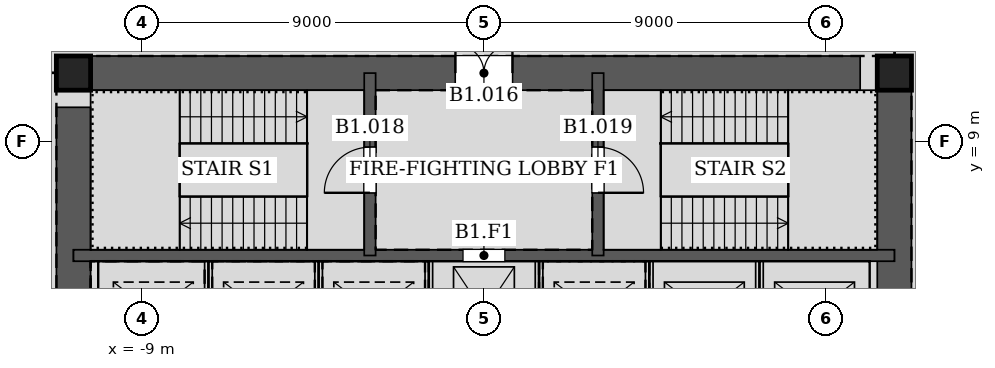
"""IFC4 building model, lengths in metres.
Left out: names, types, materials, properties, quantities, classifications, styles, units other than length and angle.
Written with IfcOpenShell. Run it as: python <this file> out.ifc"""

import sys

from ifc_helpers import new_model, si_unit, direction, frame, frame_2d, origin, origin_2d, place, context, subcontext, project, spatial, rectangle, hollow_rectangle, extrude, element, fill, save


model = new_model("IFC4")
c1 = context("Model", 3, precision=1e-05, world=origin(), true_north=direction((0.0, 1.0)))
c2 = subcontext(c1, "Body", "Model", "MODEL_VIEW")
j1 = project(units=[si_unit("LENGTHUNIT", "METRE"), si_unit("PLANEANGLEUNIT", "RADIAN")], contexts=[c1])
p1 = place(None, origin())
s1 = spatial("IfcSite", under=j1, at=p1, CompositionType="ELEMENT")
p2 = place(p1, origin())
s2 = spatial("IfcBuilding", under=s1, at=p2, CompositionType="ELEMENT")
p3 = place(p2, frame((0.0, 0.0, -4.5)))
s3 = spatial("IfcBuildingStorey", under=s2, at=p3, CompositionType="ELEMENT", Elevation=-4.5)
for number, where, z_axis, x_axis in (
    (1, (10.8, 10.8, 0.0), (0.0, 0.0, 1.0), (1.0, 0.0, 0.0)),
    (2, (-10.8, 10.8, 0.0), (0.0, 0.0, 1.0), (1.0, 0.0, 0.0)),
):
    element("IfcColumn", number, at=place(p3, frame(where, z_axis=z_axis, x_axis=x_axis)), inside=s3, PredefinedType="COLUMN", context=c2, shape_type="SweptSolid", body=[
        extrude(hollow_rectangle(XDim=0.9, YDim=0.9, WallThickness=0.06, at=origin_2d()), origin(), (0.0, 0.0, 1.0), 4.5),
    ])
p4 = place(p3, frame((10.8, -10.8, 0.0), z_axis=(0.0, 0.0, 1.0), x_axis=(0.0, 1.0, 0.0)))
e3 = element("IfcWall", 3, at=p4, inside=s3, PredefinedType="SOLIDWALL", context=c2, shape_type="SweptSolid", body=[
    extrude(rectangle(XDim=21.6, YDim=0.9, at=frame_2d((10.8, 0.0))), origin(), (0.0, 0.0, 1.0), 4.5),
])
p5 = place(p4, frame((11.7, 0.0, 0.0)))
e4 = element("IfcOpeningElement", 4, at=p5, cuts=e3, PredefinedType="OPENING", context=c2, shape_type="SweptSolid", body=[
    extrude(rectangle(XDim=1.2, YDim=2.1, at=frame_2d((0.6, 1.05))), frame((0.0, 0.46, 0.0), z_axis=(0.0, -1.0, 0.0), x_axis=(1.0, 0.0, 0.0)), (0.0, 0.0, 1.0), 0.92),
])
p6 = place(p4, frame((8.7, 0.0, 0.0)))
e5 = element("IfcOpeningElement", 5, at=p6, cuts=e3, PredefinedType="OPENING", context=c2, shape_type="SweptSolid", body=[
    extrude(rectangle(XDim=1.2, YDim=2.1, at=frame_2d((0.6, 1.05))), frame((0.0, 0.46, 0.0), z_axis=(0.0, -1.0, 0.0), x_axis=(1.0, 0.0, 0.0)), (0.0, 0.0, 1.0), 0.92),
])
p7 = place(p3, frame((10.8, 10.8, 0.0), z_axis=(0.0, 0.0, 1.0), x_axis=(-1.0, 0.0, 0.0)))
e6 = element("IfcWall", 6, at=p7, inside=s3, PredefinedType="SOLIDWALL", context=c2, shape_type="SweptSolid", body=[
    extrude(rectangle(XDim=21.6, YDim=0.9, at=frame_2d((10.8, 0.0))), origin(), (0.0, 0.0, 1.0), 4.5),
])
p8 = place(p7, frame((10.05, 0.0, 0.0)))
e7 = element("IfcOpeningElement", 7, at=p8, cuts=e6, PredefinedType="OPENING", context=c2, shape_type="SweptSolid", body=[
    extrude(rectangle(XDim=1.5, YDim=2.1, at=frame_2d((0.75, 1.05))), frame((0.0, 0.46, 0.0), z_axis=(0.0, -1.0, 0.0), x_axis=(1.0, 0.0, 0.0)), (0.0, 0.0, 1.0), 0.92),
])
p9 = place(p3, frame((-10.8, 10.8, 0.0), z_axis=(0.0, 0.0, 1.0), x_axis=(0.0, -1.0, 0.0)))
e8 = element("IfcWall", 8, at=p9, inside=s3, PredefinedType="SOLIDWALL", context=c2, shape_type="SweptSolid", body=[
    extrude(rectangle(XDim=21.6, YDim=0.9, at=frame_2d((10.8, 0.0))), origin(), (0.0, 0.0, 1.0), 4.5),
])
p10 = place(p9, frame((8.7, 0.0, 0.0)))
e9 = element("IfcOpeningElement", 9, at=p10, cuts=e8, PredefinedType="OPENING", context=c2, shape_type="SweptSolid", body=[
    extrude(rectangle(XDim=1.2, YDim=2.1, at=frame_2d((0.6, 1.05))), frame((0.0, 0.46, 0.0), z_axis=(0.0, -1.0, 0.0), x_axis=(1.0, 0.0, 0.0)), (0.0, 0.0, 1.0), 0.92),
])
p11 = place(p9, frame((11.7, 0.0, 0.0)))
e10 = element("IfcOpeningElement", 10, at=p11, cuts=e8, PredefinedType="OPENING", context=c2, shape_type="SweptSolid", body=[
    extrude(rectangle(XDim=1.2, YDim=2.1, at=frame_2d((0.6, 1.05))), frame((0.0, 0.46, 0.0), z_axis=(0.0, -1.0, 0.0), x_axis=(1.0, 0.0, 0.0)), (0.0, 0.0, 1.0), 0.92),
])
p12 = place(p3, frame((-10.8, 6.0, 0.0), z_axis=(0.0, 0.0, 1.0), x_axis=(1.0, 0.0, 0.0)))
e11 = element("IfcWall", 11, at=p12, inside=s3, PredefinedType="SOLIDWALL", context=c2, shape_type="SweptSolid", body=[
    extrude(rectangle(XDim=21.6, YDim=0.3, at=frame_2d((10.8, 0.0))), origin(), (0.0, 0.0, 1.0), 2.7),
])
p13 = place(p12, frame((10.25, 0.0, 0.0)))
e12 = element("IfcOpeningElement", 12, at=p13, cuts=e11, PredefinedType="OPENING", context=c2, shape_type="SweptSolid", body=[
    extrude(rectangle(XDim=1.1, YDim=2.1, at=frame_2d((0.55, 1.05))), frame((0.0, 0.16, 0.0), z_axis=(0.0, -1.0, 0.0), x_axis=(1.0, 0.0, 0.0)), (0.0, 0.0, 1.0), 0.32),
])
p14 = place(p3, frame((-10.8, 6.0, 2.7), z_axis=(0.0, 0.0, 1.0), x_axis=(1.0, 0.0, 0.0)))
e13 = element("IfcWall", 13, at=p14, inside=s3, PredefinedType="SOLIDWALL", context=c2, shape_type="SweptSolid", body=[
    extrude(rectangle(XDim=21.6, YDim=0.3, at=frame_2d((10.8, 0.0))), origin(), (0.0, 0.0, 1.0), 1.8),
])
p15 = place(p3, frame((-3.0, 6.0, 0.0), z_axis=(0.0, 0.0, 1.0), x_axis=(0.0, 1.0, 0.0)))
e14 = element("IfcWall", 14, at=p15, inside=s3, PredefinedType="SOLIDWALL", context=c2, shape_type="SweptSolid", body=[
    extrude(rectangle(XDim=4.8, YDim=0.3, at=frame_2d((2.4, 0.0))), origin(), (0.0, 0.0, 1.0), 4.5),
])
p16 = place(p15, frame((1.65, 0.0, 0.0)))
e15 = element("IfcOpeningElement", 15, at=p16, cuts=e14, PredefinedType="OPENING", context=c2, shape_type="SweptSolid", body=[
    extrude(rectangle(XDim=1.2, YDim=2.1, at=frame_2d((0.6, 1.05))), frame((0.0, 0.16, 0.0), z_axis=(0.0, -1.0, 0.0), x_axis=(1.0, 0.0, 0.0)), (0.0, 0.0, 1.0), 0.32),
])
p17 = place(p3, frame((3.0, 6.0, 0.0), z_axis=(0.0, 0.0, 1.0), x_axis=(0.0, 1.0, 0.0)))
e16 = element("IfcWall", 16, at=p17, inside=s3, PredefinedType="SOLIDWALL", context=c2, shape_type="SweptSolid", body=[
    extrude(rectangle(XDim=4.8, YDim=0.3, at=frame_2d((2.4, 0.0))), origin(), (0.0, 0.0, 1.0), 4.5),
])
p18 = place(p17, frame((1.65, 0.0, 0.0)))
e17 = element("IfcOpeningElement", 17, at=p18, cuts=e16, PredefinedType="OPENING", context=c2, shape_type="SweptSolid", body=[
    extrude(rectangle(XDim=1.2, YDim=2.1, at=frame_2d((0.6, 1.05))), frame((0.0, 0.16, 0.0), z_axis=(0.0, -1.0, 0.0), x_axis=(1.0, 0.0, 0.0)), (0.0, 0.0, 1.0), 0.32),
])
for number, where, z_axis, x_axis in (
    (18, (-7.25, 3.15, 0.0), (0.0, 0.0, 1.0), (0.0, 1.0, 0.0)),
    (19, (-4.35, 3.15, 0.0), (0.0, 0.0, 1.0), (0.0, 1.0, 0.0)),
    (20, (-1.45, 3.15, 0.0), (0.0, 0.0, 1.0), (0.0, 1.0, 0.0)),
    (21, (1.45, 3.15, 0.0), (0.0, 0.0, 1.0), (0.0, 1.0, 0.0)),
    (22, (4.35, 3.15, 0.0), (0.0, 0.0, 1.0), (0.0, 1.0, 0.0)),
    (23, (7.25, 3.15, 0.0), (0.0, 0.0, 1.0), (0.0, 1.0, 0.0)),
):
    element("IfcWall", number, at=place(p3, frame(where, z_axis=z_axis, x_axis=x_axis)), inside=s3, PredefinedType="PARTITIONING", context=c2, shape_type="SweptSolid", body=[
        extrude(rectangle(XDim=2.7, YDim=0.2, at=frame_2d((1.35, 0.0))), origin(), (0.0, 0.0, 1.0), 4.5),
    ])
p19 = place(p8, frame((1.5, 0.0, 0.0), z_axis=(0.0, 0.0, 1.0), x_axis=(-1.0, 0.0, 0.0)))
e24 = element("IfcDoor", 24, at=p19, inside=s3, OperationType="DOUBLE_DOOR_SINGLE_SWING", PredefinedType="DOOR", context=c2, shape_type="SweptSolid", body=[
    extrude(rectangle(XDim=1.5, YDim=2.1, at=frame_2d((0.75, 1.05))), frame((0.0, 0.025, 0.0), z_axis=(0.0, -1.0, 0.0), x_axis=(1.0, 0.0, 0.0)), (0.0, 0.0, 1.0), 0.05),
])
fill(e7, e24)
p20 = place(p16, origin())
e25 = element("IfcDoor", 25, at=p20, inside=s3, OperationType="SINGLE_SWING_LEFT", PredefinedType="DOOR", context=c2, shape_type="SweptSolid", body=[
    extrude(rectangle(XDim=1.2, YDim=2.1, at=frame_2d((0.6, 1.05))), frame((0.0, 0.025, 0.0), z_axis=(0.0, -1.0, 0.0), x_axis=(1.0, 0.0, 0.0)), (0.0, 0.0, 1.0), 0.05),
])
fill(e15, e25)
p21 = place(p18, frame((1.2, 0.0, 0.0), z_axis=(0.0, 0.0, 1.0), x_axis=(-1.0, 0.0, 0.0)))
e26 = element("IfcDoor", 26, at=p21, inside=s3, OperationType="SINGLE_SWING_RIGHT", PredefinedType="DOOR", context=c2, shape_type="SweptSolid", body=[
    extrude(rectangle(XDim=1.2, YDim=2.1, at=frame_2d((0.6, 1.05))), frame((0.0, 0.025, 0.0), z_axis=(0.0, -1.0, 0.0), x_axis=(1.0, 0.0, 0.0)), (0.0, 0.0, 1.0), 0.05),
])
fill(e17, e26)
p22 = place(p13, origin())
e27 = element("IfcDoor", 27, at=p22, inside=s3, OperationType="DOUBLE_DOOR_SLIDING", PredefinedType="DOOR", context=c2, shape_type="SweptSolid", body=[
    extrude(rectangle(XDim=1.1, YDim=2.1, at=frame_2d((0.55, 1.05))), frame((0.0, 0.025, 0.0), z_axis=(0.0, -1.0, 0.0), x_axis=(1.0, 0.0, 0.0)), (0.0, 0.0, 1.0), 0.05),
])
fill(e12, e27)
save(model, sys.argv[1])
